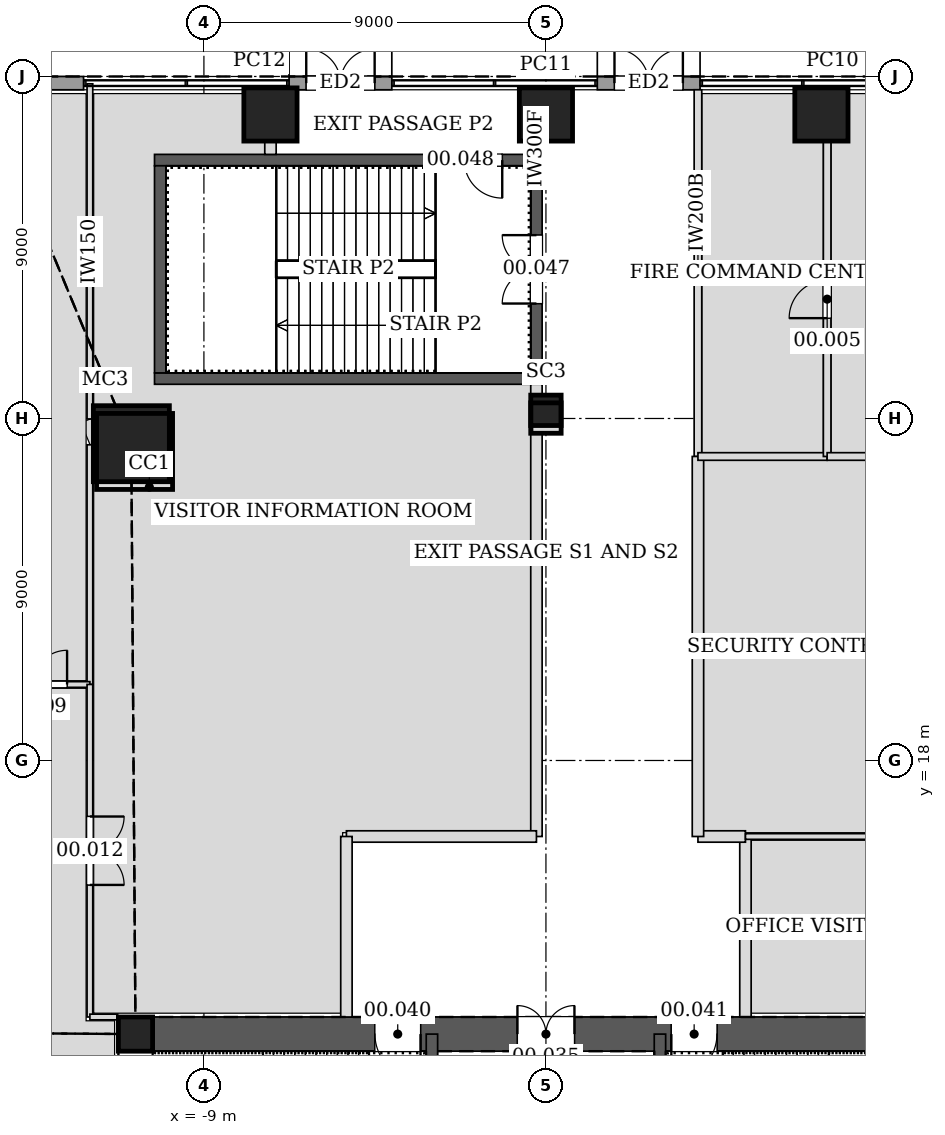
"""IFC4 building model, lengths in metres.
Left out: names, types, materials, properties, quantities, classifications, styles, units other than length and angle.
Written with IfcOpenShell. Run it as: python <this file> out.ifc"""

import sys

from ifc_helpers import new_model, si_unit, direction, frame, frame_2d, origin, origin_2d, place, context, subcontext, project, spatial, rectangle, hollow_rectangle, extrude, element, fill, save


model = new_model("IFC4")
c1 = context("Model", 3, precision=1e-05, world=origin(), true_north=direction((0.0, 1.0)))
c2 = subcontext(c1, "Body", "Model", "MODEL_VIEW")
j1 = project(units=[si_unit("LENGTHUNIT", "METRE"), si_unit("PLANEANGLEUNIT", "RADIAN")], contexts=[c1])
p1 = place(None, origin())
s1 = spatial("IfcSite", under=j1, at=p1, CompositionType="ELEMENT")
p2 = place(p1, origin())
s2 = spatial("IfcBuilding", under=s1, at=p2, CompositionType="ELEMENT")
p3 = place(p2, origin())
s3 = spatial("IfcBuildingStorey", under=s2, at=p3, CompositionType="ELEMENT", Elevation=0.0)
p4 = place(p3, frame((-10.909, 26.336, 0.0), z_axis=(0.011726897842, -0.028266568786, 0.999531630793), x_axis=(0.923665637433, 0.383199413132, 0.0)))
e1 = element("IfcColumn", 1, at=p4, inside=s3, PredefinedType="COLUMN", context=c2, shape_type="SweptSolid", body=[
    extrude(hollow_rectangle(XDim=2.0, YDim=2.0, WallThickness=0.09, at=origin_2d()), origin(), (0.0, 0.0, 1.0), 7.203),
])
p5 = place(p3, frame((0.0, 27.215, 0.0), z_axis=(0.0, -0.028268512598, 0.999600365744), x_axis=(1.0, 0.0, 0.0)))
e2 = element("IfcColumn", 2, at=p5, inside=s3, PredefinedType="COLUMN", context=c2, shape_type="SweptSolid", body=[
    extrude(hollow_rectangle(XDim=0.8, YDim=0.8, WallThickness=0.05, at=origin_2d()), origin(), (0.0, 0.0, 1.0), 7.203),
])
for number, where, z_axis, x_axis in (
    (3, (7.249, 35.0, 0.0), (0.0, 0.0, 1.0), (1.0, 0.0, 0.0)),
    (4, (0.0, 35.0, 0.0), (0.0, 0.0, 1.0), (1.0, 0.0, 0.0)),
    (5, (-7.249, 35.0, 0.0), (0.0, 0.0, 1.0), (1.0, 0.0, 0.0)),
):
    element("IfcColumn", number, at=place(p3, frame(where, z_axis=z_axis, x_axis=x_axis)), inside=s3, PredefinedType="COLUMN", context=c2, shape_type="SweptSolid", body=[
        extrude(rectangle(XDim=1.4, YDim=1.4, at=origin_2d()), origin(), (0.0, 0.0, 1.0), 7.2),
    ])
p6 = place(p3, frame((-10.8, 10.8, 0.0), z_axis=(0.0, 0.0, 1.0), x_axis=(1.0, 0.0, 0.0)))
e6 = element("IfcColumn", 6, at=p6, inside=s3, PredefinedType="COLUMN", context=c2, shape_type="SweptSolid", body=[
    extrude(hollow_rectangle(XDim=0.9, YDim=0.9, WallThickness=0.06, at=origin_2d()), origin(), (0.0, 0.0, 1.0), 7.2),
])
p7 = place(p3, frame((10.8, 10.8, 0.0), z_axis=(0.0, 0.0, 1.0), x_axis=(-1.0, 0.0, 0.0)))
e7 = element("IfcWall", 7, at=p7, inside=s3, PredefinedType="SOLIDWALL", context=c2, shape_type="SweptSolid", body=[
    extrude(rectangle(XDim=21.6, YDim=0.9, at=frame_2d((10.8, 0.0))), origin(), (0.0, 0.0, 1.0), 7.2),
])
p8 = place(p7, frame((10.05, 0.0, 0.0)))
e8 = element("IfcOpeningElement", 8, at=p8, cuts=e7, PredefinedType="OPENING", context=c2, shape_type="SweptSolid", body=[
    extrude(rectangle(XDim=1.5, YDim=2.1, at=frame_2d((0.75, 1.05))), frame((0.0, 0.46, 0.0), z_axis=(0.0, -1.0, 0.0), x_axis=(1.0, 0.0, 0.0)), (0.0, 0.0, 1.0), 0.92),
])
p9 = place(p7, frame((14.1, 0.0, 0.0)))
e9 = element("IfcOpeningElement", 9, at=p9, cuts=e7, PredefinedType="OPENING", context=c2, shape_type="SweptSolid", body=[
    extrude(rectangle(XDim=1.2, YDim=2.1, at=frame_2d((0.6, 1.05))), frame((0.0, 0.46, 0.0), z_axis=(0.0, -1.0, 0.0), x_axis=(1.0, 0.0, 0.0)), (0.0, 0.0, 1.0), 0.92),
])
p10 = place(p7, frame((6.3, 0.0, 0.0)))
e10 = element("IfcOpeningElement", 10, at=p10, cuts=e7, PredefinedType="OPENING", context=c2, shape_type="SweptSolid", body=[
    extrude(rectangle(XDim=1.2, YDim=2.1, at=frame_2d((0.6, 1.05))), frame((0.0, 0.46, 0.0), z_axis=(0.0, -1.0, 0.0), x_axis=(1.0, 0.0, 0.0)), (0.0, 0.0, 1.0), 0.92),
])
p11 = place(p3, frame((-10.8, 10.8, 0.0), z_axis=(0.0, 0.0, 1.0), x_axis=(0.0, -1.0, 0.0)))
e11 = element("IfcWall", 11, at=p11, inside=s3, PredefinedType="SOLIDWALL", context=c2, shape_type="SweptSolid", body=[
    extrude(rectangle(XDim=21.6, YDim=0.9, at=frame_2d((10.8, 0.0))), origin(), (0.0, 0.0, 1.0), 7.2),
])
p12 = place(p11, frame((8.7, 0.0, 0.0)))
e12 = element("IfcOpeningElement", 12, at=p12, cuts=e11, PredefinedType="OPENING", context=c2, shape_type="SweptSolid", body=[
    extrude(rectangle(XDim=1.2, YDim=2.1, at=frame_2d((0.6, 1.05))), frame((0.0, 0.46, 0.0), z_axis=(0.0, -1.0, 0.0), x_axis=(1.0, 0.0, 0.0)), (0.0, 0.0, 1.0), 0.92),
])
p13 = place(p11, frame((11.7, 0.0, 0.0)))
e13 = element("IfcOpeningElement", 13, at=p13, cuts=e11, PredefinedType="OPENING", context=c2, shape_type="SweptSolid", body=[
    extrude(rectangle(XDim=1.2, YDim=2.1, at=frame_2d((0.6, 1.05))), frame((0.0, 0.46, 0.0), z_axis=(0.0, -1.0, 0.0), x_axis=(1.0, 0.0, 0.0)), (0.0, 0.0, 1.0), 0.92),
])
p14 = place(p3, frame((-3.0, 6.0, 0.0), z_axis=(0.0, 0.0, 1.0), x_axis=(0.0, 1.0, 0.0)))
e14 = element("IfcWall", 14, at=p14, inside=s3, PredefinedType="SOLIDWALL", context=c2, shape_type="SweptSolid", body=[
    extrude(rectangle(XDim=4.8, YDim=0.3, at=frame_2d((2.4, 0.0))), origin(), (0.0, 0.0, 1.0), 7.2),
])
p15 = place(p14, frame((1.65, 0.0, 0.0)))
e15 = element("IfcOpeningElement", 15, at=p15, cuts=e14, PredefinedType="OPENING", context=c2, shape_type="SweptSolid", body=[
    extrude(rectangle(XDim=1.2, YDim=2.1, at=frame_2d((0.6, 1.05))), frame((0.0, 0.16, 0.0), z_axis=(0.0, -1.0, 0.0), x_axis=(1.0, 0.0, 0.0)), (0.0, 0.0, 1.0), 0.32),
])
p16 = place(p3, frame((3.0, 6.0, 0.0), z_axis=(0.0, 0.0, 1.0), x_axis=(0.0, 1.0, 0.0)))
e16 = element("IfcWall", 16, at=p16, inside=s3, PredefinedType="SOLIDWALL", context=c2, shape_type="SweptSolid", body=[
    extrude(rectangle(XDim=4.8, YDim=0.3, at=frame_2d((2.4, 0.0))), origin(), (0.0, 0.0, 1.0), 7.2),
])
p17 = place(p16, frame((1.65, 0.0, 0.0)))
e17 = element("IfcOpeningElement", 17, at=p17, cuts=e16, PredefinedType="OPENING", context=c2, shape_type="SweptSolid", body=[
    extrude(rectangle(XDim=1.2, YDim=2.1, at=frame_2d((0.6, 1.05))), frame((0.0, 0.16, 0.0), z_axis=(0.0, -1.0, 0.0), x_axis=(1.0, 0.0, 0.0)), (0.0, 0.0, 1.0), 0.32),
])
p18 = place(p3, frame((-10.3, 28.05, 0.0), z_axis=(0.0, 0.0, 1.0), x_axis=(1.0, 0.0, 0.0)))
e18 = element("IfcWall", 18, at=p18, inside=s3, PredefinedType="SOLIDWALL", context=c2, shape_type="SweptSolid", body=[
    extrude(rectangle(XDim=10.2, YDim=0.3, at=frame_2d((5.1, 0.0))), origin(), (0.0, 0.0, 1.0), 7.2),
])
p19 = place(p3, frame((-0.1, 33.8, 0.0), z_axis=(0.0, 0.0, 1.0), x_axis=(-1.0, 0.0, 0.0)))
e19 = element("IfcWall", 19, at=p19, inside=s3, PredefinedType="SOLIDWALL", context=c2, shape_type="SweptSolid", body=[
    extrude(rectangle(XDim=10.2, YDim=0.3, at=frame_2d((5.1, 0.0))), origin(), (0.0, 0.0, 1.0), 7.2),
])
p20 = place(p19, frame((1.05, 0.0, 0.0)))
e20 = element("IfcOpeningElement", 20, at=p20, cuts=e19, PredefinedType="OPENING", context=c2, shape_type="SweptSolid", body=[
    extrude(rectangle(XDim=1.0, YDim=2.1, at=frame_2d((0.5, 1.05))), frame((0.0, 0.16, 0.0), z_axis=(0.0, -1.0, 0.0), x_axis=(1.0, 0.0, 0.0)), (0.0, 0.0, 1.0), 0.32),
])
p21 = place(p3, frame((-10.15, 33.65, 0.0), z_axis=(0.0, 0.0, 1.0), x_axis=(0.0, -1.0, 0.0)))
e21 = element("IfcWall", 21, at=p21, inside=s3, PredefinedType="SOLIDWALL", context=c2, shape_type="SweptSolid", body=[
    extrude(rectangle(XDim=5.45, YDim=0.3, at=frame_2d((2.725, 0.0))), origin(), (0.0, 0.0, 1.0), 7.2),
])
p22 = place(p3, frame((-0.25, 28.2, 0.0), z_axis=(0.0, 0.0, 1.0), x_axis=(0.0, 1.0, 0.0)))
e22 = element("IfcWall", 22, at=p22, inside=s3, PredefinedType="SOLIDWALL", context=c2, shape_type="SweptSolid", body=[
    extrude(rectangle(XDim=5.45, YDim=0.3, at=frame_2d((2.725, 0.0))), origin(), (0.0, 0.0, 1.0), 7.2),
])
p23 = place(p22, frame((1.825, 0.0, 0.0)))
e23 = element("IfcOpeningElement", 23, at=p23, cuts=e22, PredefinedType="OPENING", context=c2, shape_type="SweptSolid", body=[
    extrude(rectangle(XDim=1.8, YDim=2.1, at=frame_2d((0.9, 1.05))), frame((0.0, 0.16, 0.0), z_axis=(0.0, -1.0, 0.0), x_axis=(1.0, 0.0, 0.0)), (0.0, 0.0, 1.0), 0.32),
])
p24 = place(p3, frame((4.055, 35.825, 0.0), z_axis=(0.0, 0.0, 1.0), x_axis=(-1.0, 0.0, 0.0)))
e24 = element("IfcWall", 24, at=p24, inside=s3, PredefinedType="SOLIDWALL", context=c2, shape_type="SweptSolid", body=[
    extrude(rectangle(XDim=2.704, YDim=0.35, at=frame_2d((1.352, 0.0))), origin(), (0.0, 0.0, 1.0), 6.9),
])
p25 = place(p24, frame((0.452, 0.0, 0.0)))
e25 = element("IfcOpeningElement", 25, at=p25, cuts=e24, PredefinedType="OPENING", context=c2, shape_type="SweptSolid", body=[
    extrude(rectangle(XDim=1.8, YDim=2.4, at=frame_2d((0.9, 1.2))), frame((0.0, 0.185, 0.0), z_axis=(0.0, -1.0, 0.0), x_axis=(1.0, 0.0, 0.0)), (0.0, 0.0, 1.0), 0.37),
])
p26 = place(p3, frame((-4.055, 35.825, 0.0), z_axis=(0.0, 0.0, 1.0), x_axis=(-1.0, 0.0, 0.0)))
e26 = element("IfcWall", 26, at=p26, inside=s3, PredefinedType="SOLIDWALL", context=c2, shape_type="SweptSolid", body=[
    extrude(rectangle(XDim=2.704, YDim=0.35, at=frame_2d((1.352, 0.0))), origin(), (0.0, 0.0, 1.0), 6.9),
])
p27 = place(p26, frame((0.452, 0.0, 0.0)))
e27 = element("IfcOpeningElement", 27, at=p27, cuts=e26, PredefinedType="OPENING", context=c2, shape_type="SweptSolid", body=[
    extrude(rectangle(XDim=1.8, YDim=2.4, at=frame_2d((0.9, 1.2))), frame((0.0, 0.185, 0.0), z_axis=(0.0, -1.0, 0.0), x_axis=(1.0, 0.0, 0.0)), (0.0, 0.0, 1.0), 0.37),
])
p28 = place(p3, frame((-12.167, 35.825, 0.0), z_axis=(0.0, 0.0, 1.0), x_axis=(-1.0, 0.0, 0.0)))
e28 = element("IfcWall", 28, at=p28, inside=s3, PredefinedType="SOLIDWALL", context=c2, shape_type="SweptSolid", body=[
    extrude(rectangle(XDim=2.745, YDim=0.35, at=frame_2d((1.373, 0.0))), origin(), (0.0, 0.0, 1.0), 6.9),
])
p29 = place(p3, frame((-0.25, 34.281, 0.0), z_axis=(0.0, 0.0, 1.0), x_axis=(0.0, -1.0, 0.0)))
e29 = element("IfcWall", 29, at=p29, inside=s3, PredefinedType="PARTITIONING", context=c2, shape_type="SweptSolid", body=[
    extrude(rectangle(XDim=0.332, YDim=0.3, at=frame_2d((0.166, 0.0))), origin(), (0.0, 0.0, 1.0), 6.534),
])
p30 = place(p3, frame((4.0, 25.999, 0.0), z_axis=(0.0, 0.0, 1.0), x_axis=(0.0, 1.0, 0.0)))
e30 = element("IfcWall", 30, at=p30, inside=s3, PredefinedType="PARTITIONING", context=c2, shape_type="SweptSolid", body=[
    extrude(rectangle(XDim=9.651, YDim=0.2, at=frame_2d((4.825, 0.0))), origin(), (0.0, 0.0, 1.0), 5.879),
])
p31 = place(p3, frame((-0.25, 27.9, 0.0), z_axis=(0.0, 0.0, 1.0), x_axis=(0.0, -1.0, 0.0)))
e31 = element("IfcWall", 31, at=p31, inside=s3, PredefinedType="PARTITIONING", context=c2, shape_type="SweptSolid", body=[
    extrude(rectangle(XDim=0.267, YDim=0.3, at=frame_2d((0.133, 0.0))), origin(), (0.0, 0.0, 1.0), 6.534),
])
p32 = place(p3, frame((-0.25, 26.592, 0.0), z_axis=(0.0, 0.0, 1.0), x_axis=(0.0, -1.0, 0.0)))
e32 = element("IfcWall", 32, at=p32, inside=s3, PredefinedType="PARTITIONING", context=c2, shape_type="SweptSolid", body=[
    extrude(rectangle(XDim=10.592, YDim=0.3, at=frame_2d((5.296, 0.0))), origin(), (0.0, 0.0, 1.0), 5.59),
])
p33 = place(p3, frame((-0.25, 16.0, 0.0), z_axis=(0.0, 0.0, 1.0), x_axis=(-1.0, 0.0, 0.0)))
e33 = element("IfcWall", 33, at=p33, inside=s3, PredefinedType="PARTITIONING", context=c2, shape_type="SweptSolid", body=[
    extrude(rectangle(XDim=5.0, YDim=0.3, at=frame_2d((2.5, 0.0))), origin(), (0.0, 0.0, 1.0), 5.59),
])
for number, where, z_axis, x_axis in (
    (34, (-5.25, 16.0, 0.0), (0.0, 0.0, 1.0), (0.0, -1.0, 0.0)),
    (35, (5.25, 11.25, 0.0), (0.0, 0.0, 1.0), (0.0, 1.0, 0.0)),
):
    element("IfcWall", number, at=place(p3, frame(where, z_axis=z_axis, x_axis=x_axis)), inside=s3, PredefinedType="PARTITIONING", context=c2, shape_type="SweptSolid", body=[
        extrude(rectangle(XDim=4.75, YDim=0.3, at=frame_2d((2.375, 0.0))), origin(), (0.0, 0.0, 1.0), 6.212),
    ])
p34 = place(p3, frame((5.25, 16.0, 0.0), z_axis=(0.0, 0.0, 1.0), x_axis=(-1.0, 0.0, 0.0)))
e36 = element("IfcWall", 36, at=p34, inside=s3, PredefinedType="PARTITIONING", context=c2, shape_type="SweptSolid", body=[
    extrude(rectangle(XDim=1.25, YDim=0.3, at=frame_2d((0.625, 0.0))), origin(), (0.0, 0.0, 1.0), 6.283),
])
p35 = place(p3, frame((4.0, 16.0, 0.0), z_axis=(0.0, 0.0, 1.0), x_axis=(0.0, 1.0, 0.0)))
e37 = element("IfcWall", 37, at=p35, inside=s3, PredefinedType="PARTITIONING", context=c2, shape_type="SweptSolid", body=[
    extrude(rectangle(XDim=10.001, YDim=0.3, at=frame_2d((5.0, 0.0))), origin(), (0.0, 0.0, 1.0), 5.963),
])
p36 = place(p3, frame((-7.249, 34.281, 0.0), z_axis=(0.0, 0.0, 1.0), x_axis=(0.0, -1.0, 0.0)))
e38 = element("IfcWall", 38, at=p36, inside=s3, PredefinedType="PARTITIONING", context=c2, shape_type="SweptSolid", body=[
    extrude(rectangle(XDim=0.332, YDim=0.3, at=frame_2d((0.166, 0.0))), origin(), (0.0, 0.0, 1.0), 6.291),
])
p37 = place(p3, frame((4.0, 26.0, 0.0), z_axis=(0.0, 0.0, 1.0), x_axis=(1.0, 0.0, 0.0)))
e39 = element("IfcWall", 39, at=p37, inside=s3, PredefinedType="PARTITIONING", context=c2, shape_type="SweptSolid", body=[
    extrude(rectangle(XDim=3.4, YDim=0.2, at=frame_2d((1.7, 0.0))), origin(), (0.0, 0.0, 1.0), 6.9),
])
p38 = place(p3, frame((7.4, 26.0, 0.0), z_axis=(0.0, 0.0, 1.0), x_axis=(0.0, 1.0, 0.0)))
e40 = element("IfcWall", 40, at=p38, inside=s3, PredefinedType="PARTITIONING", context=c2, shape_type="SweptSolid", body=[
    extrude(rectangle(XDim=8.281, YDim=0.2, at=frame_2d((4.141, 0.0))), origin(), (0.0, 0.0, 1.0), 5.879),
])
p39 = place(p38, frame((3.64, 0.0, 0.0)))
e41 = element("IfcOpeningElement", 41, at=p39, cuts=e40, PredefinedType="OPENING", context=c2, shape_type="SweptSolid", body=[
    extrude(rectangle(XDim=1.0, YDim=2.1, at=frame_2d((0.5, 1.05))), frame((0.0, 0.11, 0.0), z_axis=(0.0, -1.0, 0.0), x_axis=(1.0, 0.0, 0.0)), (0.0, 0.0, 1.0), 0.22),
])
p40 = place(p3, frame((-12.0, 20.0, 0.0), z_axis=(0.0, 0.0, 1.0), x_axis=(0.0, 1.0, 0.0)))
e42 = element("IfcWall", 42, at=p40, inside=s3, PredefinedType="PARTITIONING", context=c2, shape_type="SweptSolid", body=[
    extrude(rectangle(XDim=6.308, YDim=0.15, at=frame_2d((3.154, 0.0))), origin(), (0.0, 0.0, 1.0), 6.049),
])
p41 = place(p3, frame((-12.0, 26.988, 0.0), z_axis=(0.0, 0.0, 1.0), x_axis=(0.0, 1.0, 0.0)))
e43 = element("IfcWall", 43, at=p41, inside=s3, PredefinedType="PARTITIONING", context=c2, shape_type="SweptSolid", body=[
    extrude(rectangle(XDim=8.819, YDim=0.15, at=frame_2d((4.409, 0.0))), origin(), (0.0, 0.0, 1.0), 5.907),
])
p42 = place(p3, frame((-15.001, 20.0, 0.0), z_axis=(0.0, 0.0, 1.0), x_axis=(1.0, 0.0, 0.0)))
e44 = element("IfcWall", 44, at=p42, inside=s3, PredefinedType="PARTITIONING", context=c2, shape_type="SweptSolid", body=[
    extrude(rectangle(XDim=3.001, YDim=0.15, at=frame_2d((1.5, 0.0))), origin(), (0.0, 0.0, 1.0), 6.288),
])
p43 = place(p42, frame((0.601, 0.0, 0.0)))
e45 = element("IfcOpeningElement", 45, at=p43, cuts=e44, PredefinedType="OPENING", context=c2, shape_type="SweptSolid", body=[
    extrude(rectangle(XDim=1.8, YDim=2.4, at=frame_2d((0.9, 1.2))), frame((0.0, 0.085, 0.0), z_axis=(0.0, -1.0, 0.0), x_axis=(1.0, 0.0, 0.0)), (0.0, 0.0, 1.0), 0.17),
])
p44 = place(p3, frame((-12.0, 20.001, 0.0), z_axis=(0.0, 0.0, 1.0), x_axis=(0.0, -1.0, 0.0)))
e46 = element("IfcWall", 46, at=p44, inside=s3, PredefinedType="PARTITIONING", context=c2, shape_type="SweptSolid", body=[
    extrude(rectangle(XDim=8.751, YDim=0.15, at=frame_2d((4.375, 0.0))), origin(), (0.0, 0.0, 1.0), 5.79),
])
p45 = place(p44, frame((3.476, 0.0, 0.0)))
e47 = element("IfcOpeningElement", 47, at=p45, cuts=e46, PredefinedType="OPENING", context=c2, shape_type="SweptSolid", body=[
    extrude(rectangle(XDim=1.8, YDim=2.4, at=frame_2d((0.9, 1.2))), frame((0.0, 0.085, 0.0), z_axis=(0.0, -1.0, 0.0), x_axis=(1.0, 0.0, 0.0)), (0.0, 0.0, 1.0), 0.17),
])
p46 = place(p3, frame((-12.0, 11.25, 0.0), z_axis=(0.0, 0.0, 1.0), x_axis=(1.0, 0.0, 0.0)))
e48 = element("IfcWall", 48, at=p46, inside=s3, PredefinedType="PARTITIONING", context=c2, shape_type="SweptSolid", body=[
    extrude(rectangle(XDim=0.731, YDim=0.15, at=frame_2d((0.365, 0.0))), origin(), (0.0, 0.0, 1.0), 5.79),
])
p47 = place(p3, frame((11.001, 16.0, 0.0), z_axis=(0.0, 0.0, 1.0), x_axis=(-1.0, 0.0, 0.0)))
e49 = element("IfcWall", 49, at=p47, inside=s3, PredefinedType="PARTITIONING", context=c2, shape_type="SweptSolid", body=[
    extrude(rectangle(XDim=5.751, YDim=0.15, at=frame_2d((2.875, 0.0))), origin(), (0.0, 0.0, 1.0), 5.59),
])
p48 = place(p3, frame((9.667, 26.0, 0.0), z_axis=(0.0, 0.0, 1.0), x_axis=(-1.0, 0.0, 0.0)))
e50 = element("IfcWall", 50, at=p48, inside=s3, PredefinedType="PARTITIONING", context=c2, shape_type="SweptSolid", body=[
    extrude(rectangle(XDim=2.268, YDim=0.2, at=frame_2d((1.134, 0.0))), origin(), (0.0, 0.0, 1.0), 5.879),
])
p49 = place(p25, frame((1.8, 0.0, 0.0), z_axis=(0.0, 0.0, 1.0), x_axis=(-1.0, 0.0, 0.0)))
e51 = element("IfcDoor", 51, at=p49, inside=s3, OperationType="DOUBLE_DOOR_SINGLE_SWING", PredefinedType="DOOR", context=c2, shape_type="SweptSolid", body=[
    extrude(rectangle(XDim=1.8, YDim=2.4, at=frame_2d((0.9, 1.2))), frame((0.0, 0.025, 0.0), z_axis=(0.0, -1.0, 0.0), x_axis=(1.0, 0.0, 0.0)), (0.0, 0.0, 1.0), 0.05),
])
fill(e25, e51)
p50 = place(p27, frame((1.8, 0.0, 0.0), z_axis=(0.0, 0.0, 1.0), x_axis=(-1.0, 0.0, 0.0)))
e52 = element("IfcDoor", 52, at=p50, inside=s3, OperationType="DOUBLE_DOOR_SINGLE_SWING", PredefinedType="DOOR", context=c2, shape_type="SweptSolid", body=[
    extrude(rectangle(XDim=1.8, YDim=2.4, at=frame_2d((0.9, 1.2))), frame((0.0, 0.025, 0.0), z_axis=(0.0, -1.0, 0.0), x_axis=(1.0, 0.0, 0.0)), (0.0, 0.0, 1.0), 0.05),
])
fill(e27, e52)
p51 = place(p39, origin())
e53 = element("IfcDoor", 53, at=p51, inside=s3, OperationType="SINGLE_SWING_LEFT", PredefinedType="DOOR", context=c2, shape_type="SweptSolid", body=[
    extrude(rectangle(XDim=1.0, YDim=2.1, at=frame_2d((0.5, 1.05))), frame((0.0, 0.025, 0.0), z_axis=(0.0, -1.0, 0.0), x_axis=(1.0, 0.0, 0.0)), (0.0, 0.0, 1.0), 0.05),
])
fill(e41, e53)
p52 = place(p43, origin())
e54 = element("IfcDoor", 54, at=p52, inside=s3, OperationType="DOUBLE_DOOR_SINGLE_SWING", PredefinedType="DOOR", context=c2, shape_type="SweptSolid", body=[
    extrude(rectangle(XDim=1.8, YDim=2.4, at=frame_2d((0.9, 1.2))), frame((0.0, 0.025, 0.0), z_axis=(0.0, -1.0, 0.0), x_axis=(1.0, 0.0, 0.0)), (0.0, 0.0, 1.0), 0.05),
])
fill(e45, e54)
p53 = place(p45, origin())
e55 = element("IfcDoor", 55, at=p53, inside=s3, OperationType="DOUBLE_DOOR_SINGLE_SWING", PredefinedType="DOOR", context=c2, shape_type="SweptSolid", body=[
    extrude(rectangle(XDim=1.8, YDim=2.4, at=frame_2d((0.9, 1.2))), frame((0.0, 0.025, 0.0), z_axis=(0.0, -1.0, 0.0), x_axis=(1.0, 0.0, 0.0)), (0.0, 0.0, 1.0), 0.05),
])
fill(e47, e55)
p54 = place(p8, frame((1.5, 0.0, 0.0), z_axis=(0.0, 0.0, 1.0), x_axis=(-1.0, 0.0, 0.0)))
e56 = element("IfcDoor", 56, at=p54, inside=s3, OperationType="DOUBLE_DOOR_SINGLE_SWING", PredefinedType="DOOR", context=c2, shape_type="SweptSolid", body=[
    extrude(rectangle(XDim=1.5, YDim=2.1, at=frame_2d((0.75, 1.05))), frame((0.0, 0.025, 0.0), z_axis=(0.0, -1.0, 0.0), x_axis=(1.0, 0.0, 0.0)), (0.0, 0.0, 1.0), 0.05),
])
fill(e8, e56)
p55 = place(p9, origin())
e57 = element("IfcDoor", 57, at=p55, inside=s3, OperationType="SINGLE_SWING_LEFT", PredefinedType="DOOR", context=c2, shape_type="SweptSolid", body=[
    extrude(rectangle(XDim=1.2, YDim=2.1, at=frame_2d((0.6, 1.05))), frame((0.0, 0.025, 0.0), z_axis=(0.0, -1.0, 0.0), x_axis=(1.0, 0.0, 0.0)), (0.0, 0.0, 1.0), 0.05),
])
fill(e9, e57)
p56 = place(p10, origin())
e58 = element("IfcDoor", 58, at=p56, inside=s3, OperationType="SINGLE_SWING_RIGHT", PredefinedType="DOOR", context=c2, shape_type="SweptSolid", body=[
    extrude(rectangle(XDim=1.2, YDim=2.1, at=frame_2d((0.6, 1.05))), frame((0.0, 0.025, 0.0), z_axis=(0.0, -1.0, 0.0), x_axis=(1.0, 0.0, 0.0)), (0.0, 0.0, 1.0), 0.05),
])
fill(e10, e58)
p57 = place(p23, origin())
e59 = element("IfcDoor", 59, at=p57, inside=s3, OperationType="DOUBLE_DOOR_SINGLE_SWING", PredefinedType="DOOR", context=c2, shape_type="SweptSolid", body=[
    extrude(rectangle(XDim=1.8, YDim=2.1, at=frame_2d((0.9, 1.05))), frame((0.0, 0.025, 0.0), z_axis=(0.0, -1.0, 0.0), x_axis=(1.0, 0.0, 0.0)), (0.0, 0.0, 1.0), 0.05),
])
fill(e23, e59)
p58 = place(p20, origin())
e60 = element("IfcDoor", 60, at=p58, inside=s3, OperationType="SINGLE_SWING_LEFT", PredefinedType="DOOR", context=c2, shape_type="SweptSolid", body=[
    extrude(rectangle(XDim=1.0, YDim=2.1, at=frame_2d((0.5, 1.05))), frame((0.0, 0.025, 0.0), z_axis=(0.0, -1.0, 0.0), x_axis=(1.0, 0.0, 0.0)), (0.0, 0.0, 1.0), 0.05),
])
fill(e20, e60)
save(model, sys.argv[1])
